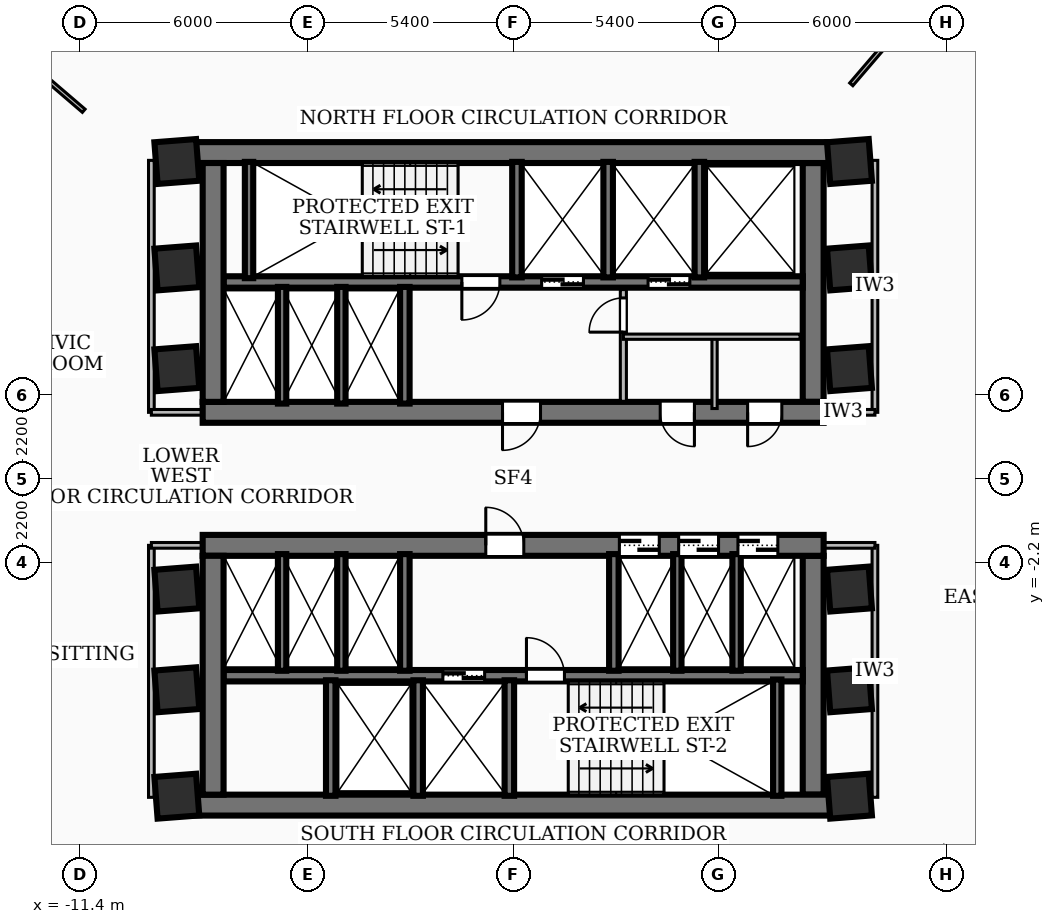
"""IFC4 building model, lengths in metres.
Left out: names, types, materials, properties, quantities, classifications, styles, units other than length and angle.
Written with IfcOpenShell. Run it as: python <this file> out.ifc"""

import sys

from ifc_helpers import new_model, si_unit, direction, frame, frame_2d, origin, origin_2d, place, context, subcontext, project, spatial, rectangle, extrude, element, fill, save


model = new_model("IFC4")
c1 = context("Model", 3, precision=1e-05, world=origin(), true_north=direction((0.0, 1.0)))
c2 = subcontext(c1, "Body", "Model", "MODEL_VIEW")
j1 = project(units=[si_unit("LENGTHUNIT", "METRE"), si_unit("PLANEANGLEUNIT", "RADIAN")], contexts=[c1])
p1 = place(None, origin())
s1 = spatial("IfcSite", under=j1, at=p1, CompositionType="ELEMENT")
p2 = place(p1, origin())
s2 = spatial("IfcBuilding", under=s1, at=p2, CompositionType="ELEMENT")
p3 = place(p2, frame((0.0, 0.0, 60.48)))
s3 = spatial("IfcBuildingStorey", under=s2, at=p3, CompositionType="ELEMENT", Elevation=60.48)
p4 = place(p3, frame((-8.78, 8.585, 0.0), z_axis=(0.0, 0.0, 1.0), x_axis=(1.0, 0.0, 0.0)))
e1 = element("IfcWall", 1, at=p4, inside=s3, PredefinedType="SHEAR", context=c2, shape_type="SweptSolid", body=[
    extrude(rectangle(XDim=17.56, YDim=0.55, at=frame_2d((8.78, 0.0))), origin(), (0.0, 0.0, 1.0), 3.32),
])
p5 = place(p3, frame((8.17, 1.75, 0.0), z_axis=(0.0, 0.0, 1.0), x_axis=(-1.0, 0.0, 0.0)))
e2 = element("IfcWall", 2, at=p5, inside=s3, PredefinedType="SHEAR", context=c2, shape_type="SweptSolid", body=[
    extrude(rectangle(XDim=16.34, YDim=0.55, at=frame_2d((8.17, 0.0))), origin(), (0.0, 0.0, 1.0), 3.32),
])
p6 = place(p5, frame((7.45, 0.0, 0.0)))
e3 = element("IfcOpeningElement", 3, at=p6, cuts=e2, PredefinedType="OPENING", context=c2, shape_type="SweptSolid", body=[
    extrude(rectangle(XDim=1.0, YDim=2.1, at=frame_2d((0.5, 1.05))), frame((0.0, 0.285, 0.0), z_axis=(0.0, -1.0, 0.0), x_axis=(1.0, 0.0, 0.0)), (0.0, 0.0, 1.0), 0.57),
])
p7 = place(p5, frame((3.4, 0.0, 0.0)))
e4 = element("IfcOpeningElement", 4, at=p7, cuts=e2, PredefinedType="OPENING", context=c2, shape_type="SweptSolid", body=[
    extrude(rectangle(XDim=0.9, YDim=2.06, at=frame_2d((0.45, 1.03))), frame((0.0, 0.285, 0.0), z_axis=(0.0, -1.0, 0.0), x_axis=(1.0, 0.0, 0.0)), (0.0, 0.0, 1.0), 0.57),
])
p8 = place(p5, frame((1.1, 0.0, 0.0)))
e5 = element("IfcOpeningElement", 5, at=p8, cuts=e2, PredefinedType="OPENING", context=c2, shape_type="SweptSolid", body=[
    extrude(rectangle(XDim=0.9, YDim=2.06, at=frame_2d((0.45, 1.03))), frame((0.0, 0.285, 0.0), z_axis=(0.0, -1.0, 0.0), x_axis=(1.0, 0.0, 0.0)), (0.0, 0.0, 1.0), 0.57),
])
for number, where, z_axis, x_axis in (
    (6, (-7.895, 2.025, 0.0), (0.0, 0.0, 1.0), (0.0, 1.0, 0.0)),
    (7, (7.895, 8.31, 0.0), (0.0, 0.0, 1.0), (0.0, -1.0, 0.0)),
):
    element("IfcWall", number, at=place(p3, frame(where, z_axis=z_axis, x_axis=x_axis)), inside=s3, PredefinedType="SHEAR", context=c2, shape_type="SweptSolid", body=[
        extrude(rectangle(XDim=6.285, YDim=0.55, at=frame_2d((3.143, 0.0))), origin(), (0.0, 0.0, 1.0), 3.32),
    ])
p9 = place(p3, frame((7.62, 5.18, 0.0), z_axis=(0.0, 0.0, 1.0), x_axis=(-1.0, 0.0, 0.0)))
e8 = element("IfcWall", 8, at=p9, inside=s3, PredefinedType="SOLIDWALL", context=c2, shape_type="SweptSolid", body=[
    extrude(rectangle(XDim=15.24, YDim=0.3, at=frame_2d((7.62, 0.0))), origin(), (0.0, 0.0, 1.0), 3.32),
])
p10 = place(p9, frame((5.77, 0.0, 0.0)))
e9 = element("IfcOpeningElement", 9, at=p10, cuts=e8, PredefinedType="OPENING", context=c2, shape_type="SweptSolid", body=[
    extrude(rectangle(XDim=1.1, YDim=2.15, at=frame_2d((0.55, 1.075))), frame((0.0, 0.16, 0.0), z_axis=(0.0, -1.0, 0.0), x_axis=(1.0, 0.0, 0.0)), (0.0, 0.0, 1.0), 0.32),
])
p11 = place(p9, frame((2.97, 0.0, 0.0)))
e10 = element("IfcOpeningElement", 10, at=p11, cuts=e8, PredefinedType="OPENING", context=c2, shape_type="SweptSolid", body=[
    extrude(rectangle(XDim=1.1, YDim=2.15, at=frame_2d((0.55, 1.075))), frame((0.0, 0.16, 0.0), z_axis=(0.0, -1.0, 0.0), x_axis=(1.0, 0.0, 0.0)), (0.0, 0.0, 1.0), 0.32),
])
p12 = place(p9, frame((7.97, 0.0, 0.0)))
e11 = element("IfcOpeningElement", 11, at=p12, cuts=e8, PredefinedType="OPENING", context=c2, shape_type="SweptSolid", body=[
    extrude(rectangle(XDim=1.0, YDim=2.1, at=frame_2d((0.5, 1.05))), frame((0.0, 0.16, 0.0), z_axis=(0.0, -1.0, 0.0), x_axis=(1.0, 0.0, 0.0)), (0.0, 0.0, 1.0), 0.32),
])
p13 = place(p3, frame((8.78, -8.585, 0.0), z_axis=(0.0, 0.0, 1.0), x_axis=(-1.0, 0.0, 0.0)))
e12 = element("IfcWall", 12, at=p13, inside=s3, PredefinedType="SHEAR", context=c2, shape_type="SweptSolid", body=[
    extrude(rectangle(XDim=17.56, YDim=0.55, at=frame_2d((8.78, 0.0))), origin(), (0.0, 0.0, 1.0), 3.32),
])
p14 = place(p3, frame((-8.17, -1.75, 0.0), z_axis=(0.0, 0.0, 1.0), x_axis=(1.0, 0.0, 0.0)))
e13 = element("IfcWall", 13, at=p14, inside=s3, PredefinedType="SHEAR", context=c2, shape_type="SweptSolid", body=[
    extrude(rectangle(XDim=16.34, YDim=0.55, at=frame_2d((8.17, 0.0))), origin(), (0.0, 0.0, 1.0), 3.32),
])
p15 = place(p14, frame((7.45, 0.0, 0.0)))
e14 = element("IfcOpeningElement", 14, at=p15, cuts=e13, PredefinedType="OPENING", context=c2, shape_type="SweptSolid", body=[
    extrude(rectangle(XDim=1.0, YDim=2.1, at=frame_2d((0.5, 1.05))), frame((0.0, 0.285, 0.0), z_axis=(0.0, -1.0, 0.0), x_axis=(1.0, 0.0, 0.0)), (0.0, 0.0, 1.0), 0.57),
])
p16 = place(p14, frame((10.965, 0.0, 0.0)))
e15 = element("IfcOpeningElement", 15, at=p16, cuts=e13, PredefinedType="OPENING", context=c2, shape_type="SweptSolid", body=[
    extrude(rectangle(XDim=1.05, YDim=2.15, at=frame_2d((0.525, 1.075))), frame((0.0, 0.285, 0.0), z_axis=(0.0, -1.0, 0.0), x_axis=(1.0, 0.0, 0.0)), (0.0, 0.0, 1.0), 0.57),
])
p17 = place(p14, frame((12.525, 0.0, 0.0)))
e16 = element("IfcOpeningElement", 16, at=p17, cuts=e13, PredefinedType="OPENING", context=c2, shape_type="SweptSolid", body=[
    extrude(rectangle(XDim=1.05, YDim=2.15, at=frame_2d((0.525, 1.075))), frame((0.0, 0.285, 0.0), z_axis=(0.0, -1.0, 0.0), x_axis=(1.0, 0.0, 0.0)), (0.0, 0.0, 1.0), 0.57),
])
p18 = place(p14, frame((14.085, 0.0, 0.0)))
e17 = element("IfcOpeningElement", 17, at=p18, cuts=e13, PredefinedType="OPENING", context=c2, shape_type="SweptSolid", body=[
    extrude(rectangle(XDim=1.05, YDim=2.15, at=frame_2d((0.525, 1.075))), frame((0.0, 0.285, 0.0), z_axis=(0.0, -1.0, 0.0), x_axis=(1.0, 0.0, 0.0)), (0.0, 0.0, 1.0), 0.57),
])
for number, where, z_axis, x_axis in (
    (18, (-7.895, -8.31, 0.0), (0.0, 0.0, 1.0), (0.0, 1.0, 0.0)),
    (19, (7.895, -2.025, 0.0), (0.0, 0.0, 1.0), (0.0, -1.0, 0.0)),
):
    element("IfcWall", number, at=place(p3, frame(where, z_axis=z_axis, x_axis=x_axis)), inside=s3, PredefinedType="SHEAR", context=c2, shape_type="SweptSolid", body=[
        extrude(rectangle(XDim=6.285, YDim=0.55, at=frame_2d((3.143, 0.0))), origin(), (0.0, 0.0, 1.0), 3.32),
    ])
p19 = place(p3, frame((-7.62, -5.18, 0.0), z_axis=(0.0, 0.0, 1.0), x_axis=(1.0, 0.0, 0.0)))
e20 = element("IfcWall", 20, at=p19, inside=s3, PredefinedType="SOLIDWALL", context=c2, shape_type="SweptSolid", body=[
    extrude(rectangle(XDim=15.24, YDim=0.3, at=frame_2d((7.62, 0.0))), origin(), (0.0, 0.0, 1.0), 3.32),
])
p20 = place(p19, frame((5.77, 0.0, 0.0)))
e21 = element("IfcOpeningElement", 21, at=p20, cuts=e20, PredefinedType="OPENING", context=c2, shape_type="SweptSolid", body=[
    extrude(rectangle(XDim=1.1, YDim=2.15, at=frame_2d((0.55, 1.075))), frame((0.0, 0.16, 0.0), z_axis=(0.0, -1.0, 0.0), x_axis=(1.0, 0.0, 0.0)), (0.0, 0.0, 1.0), 0.32),
])
p21 = place(p19, frame((7.97, 0.0, 0.0)))
e22 = element("IfcOpeningElement", 22, at=p21, cuts=e20, PredefinedType="OPENING", context=c2, shape_type="SweptSolid", body=[
    extrude(rectangle(XDim=1.0, YDim=2.1, at=frame_2d((0.5, 1.05))), frame((0.0, 0.16, 0.0), z_axis=(0.0, -1.0, 0.0), x_axis=(1.0, 0.0, 0.0)), (0.0, 0.0, 1.0), 0.32),
])
for number, where, z_axis, x_axis in (
    (23, (-6.95, 5.28, 0.0), (0.0, 0.0, 1.0), (0.0, 1.0, 0.0)),
    (24, (6.95, -8.34, 0.0), (0.0, 0.0, 1.0), (0.0, 1.0, 0.0)),
):
    element("IfcWall", number, at=place(p3, frame(where, z_axis=z_axis, x_axis=x_axis)), inside=s3, PredefinedType="SOLIDWALL", context=c2, shape_type="SweptSolid", body=[
        extrude(rectangle(XDim=3.06, YDim=0.22, at=frame_2d((1.53, 0.0))), origin(), (0.0, 0.0, 1.0), 3.32),
    ])
for number, where, z_axis, x_axis in (
    (25, (0.1, 5.3, 0.0), (0.0, 0.0, 1.0), (0.0, 1.0, 0.0)),
    (26, (2.5, 5.3, 0.0), (0.0, 0.0, 1.0), (0.0, 1.0, 0.0)),
    (27, (4.9, 5.3, 0.0), (0.0, 0.0, 1.0), (0.0, 1.0, 0.0)),
):
    element("IfcWall", number, at=place(p3, frame(where, z_axis=z_axis, x_axis=x_axis)), inside=s3, PredefinedType="SOLIDWALL", context=c2, shape_type="SweptSolid", body=[
        extrude(rectangle(XDim=3.04, YDim=0.25, at=frame_2d((1.52, 0.0))), origin(), (0.0, 0.0, 1.0), 3.32),
    ])
p22 = place(p3, frame((-2.85, 1.98, 0.0), z_axis=(0.0, 0.0, 1.0), x_axis=(0.0, 1.0, 0.0)))
e28 = element("IfcWall", 28, at=p22, inside=s3, PredefinedType="SOLIDWALL", context=c2, shape_type="SweptSolid", body=[
    extrude(rectangle(XDim=3.07, YDim=0.25, at=frame_2d((1.535, 0.0))), origin(), (0.0, 0.0, 1.0), 3.32),
])
for number, where, z_axis, x_axis in (
    (29, (-0.1, -8.34, 0.0), (0.0, 0.0, 1.0), (0.0, 1.0, 0.0)),
    (30, (-2.5, -8.34, 0.0), (0.0, 0.0, 1.0), (0.0, 1.0, 0.0)),
    (31, (-4.8, -8.34, 0.0), (0.0, 0.0, 1.0), (0.0, 1.0, 0.0)),
):
    element("IfcWall", number, at=place(p3, frame(where, z_axis=z_axis, x_axis=x_axis)), inside=s3, PredefinedType="SOLIDWALL", context=c2, shape_type="SweptSolid", body=[
        extrude(rectangle(XDim=3.04, YDim=0.25, at=frame_2d((1.52, 0.0))), origin(), (0.0, 0.0, 1.0), 3.32),
    ])
for number, where, z_axis, x_axis in (
    (32, (-2.85, -5.05, 0.0), (0.0, 0.0, 1.0), (0.0, 1.0, 0.0)),
    (33, (2.65, -5.05, 0.0), (0.0, 0.0, 1.0), (0.0, 1.0, 0.0)),
):
    element("IfcWall", number, at=place(p3, frame(where, z_axis=z_axis, x_axis=x_axis)), inside=s3, PredefinedType="SOLIDWALL", context=c2, shape_type="SweptSolid", body=[
        extrude(rectangle(XDim=3.07, YDim=0.25, at=frame_2d((1.535, 0.0))), origin(), (0.0, 0.0, 1.0), 3.32),
    ])
for number, where, z_axis, x_axis in (
    (34, (-6.08, 1.98, 0.0), (0.0, 0.0, 1.0), (0.0, 1.0, 0.0)),
    (35, (-4.52, 1.98, 0.0), (0.0, 0.0, 1.0), (0.0, 1.0, 0.0)),
    (36, (4.32, -5.05, 0.0), (0.0, 0.0, 1.0), (0.0, 1.0, 0.0)),
    (37, (5.88, -5.05, 0.0), (0.0, 0.0, 1.0), (0.0, 1.0, 0.0)),
    (38, (-6.08, -5.05, 0.0), (0.0, 0.0, 1.0), (0.0, 1.0, 0.0)),
    (39, (-4.52, -5.05, 0.0), (0.0, 0.0, 1.0), (0.0, 1.0, 0.0)),
):
    element("IfcWall", number, at=place(p3, frame(where, z_axis=z_axis, x_axis=x_axis)), inside=s3, PredefinedType="SOLIDWALL", context=c2, shape_type="SweptSolid", body=[
        extrude(rectangle(XDim=3.07, YDim=0.22, at=frame_2d((1.535, 0.0))), origin(), (0.0, 0.0, 1.0), 3.32),
    ])
for number, where, z_axis, x_axis in (
    (40, (-8.85, -5.55, 0.0), (0.0, 0.0, 1.0), (0.997, 0.077, 0.0)),
    (41, (-8.85, -2.9, 0.0), (0.0, 0.0, 1.0), (0.997, 0.077, 0.0)),
    (42, (-8.85, 2.9, 0.0), (0.0, 0.0, 1.0), (0.997, 0.077, 0.0)),
    (43, (-8.85, 5.55, 0.0), (0.0, 0.0, 1.0), (0.997, 0.077, 0.0)),
    (44, (8.85, -5.55, 0.0), (0.0, 0.0, 1.0), (0.997, 0.077, 0.0)),
    (45, (8.85, -2.9, 0.0), (0.0, 0.0, 1.0), (0.997, 0.077, 0.0)),
    (46, (8.85, 2.9, 0.0), (0.0, 0.0, 1.0), (0.997, 0.077, 0.0)),
    (47, (8.85, 5.55, 0.0), (0.0, 0.0, 1.0), (0.997, 0.077, 0.0)),
    (48, (-8.85, 8.35, 0.0), (0.0, 0.0, 1.0), (0.997, 0.077, 0.0)),
    (49, (8.85, -8.35, 0.0), (0.0, 0.0, 1.0), (0.997, 0.077, 0.0)),
    (50, (8.85, 8.35, 0.0), (0.0, 0.0, 1.0), (0.997, 0.077, 0.0)),
    (51, (-8.85, -8.35, 0.0), (0.0, 0.0, 1.0), (0.997, 0.077, 0.0)),
):
    element("IfcColumn", number, at=place(p3, frame(where, z_axis=z_axis, x_axis=x_axis)), inside=s3, PredefinedType="COLUMN", context=c2, shape_type="SweptSolid", body=[
        extrude(rectangle(XDim=1.1, YDim=1.1, at=origin_2d()), origin(), (0.0, 0.0, 1.0), 3.6),
    ])
p23 = place(p3, frame((2.9, 2.04, 0.0), z_axis=(0.0, 0.0, 1.0), x_axis=(0.0, 1.0, 0.0)))
e52 = element("IfcWall", 52, at=p23, inside=s3, PredefinedType="PARTITIONING", context=c2, shape_type="SweptSolid", body=[
    extrude(rectangle(XDim=2.94, YDim=0.16, at=frame_2d((1.47, 0.0))), origin(), (0.0, 0.0, 1.0), 2.385),
])
p24 = place(p23, frame((1.82, 0.0, 0.0)))
e53 = element("IfcOpeningElement", 53, at=p24, cuts=e52, PredefinedType="OPENING", context=c2, shape_type="SweptSolid", body=[
    extrude(rectangle(XDim=0.9, YDim=2.06, at=frame_2d((0.45, 1.03))), frame((0.0, 0.09, 0.0), z_axis=(0.0, -1.0, 0.0), x_axis=(1.0, 0.0, 0.0)), (0.0, 0.0, 1.0), 0.18),
])
p25 = place(p3, frame((2.9, 3.74, 0.0), z_axis=(0.0, 0.0, 1.0), x_axis=(1.0, 0.0, 0.0)))
e54 = element("IfcWall", 54, at=p25, inside=s3, PredefinedType="PARTITIONING", context=c2, shape_type="SweptSolid", body=[
    extrude(rectangle(XDim=4.65, YDim=0.138, at=frame_2d((2.325, 0.0))), origin(), (0.0, 0.0, 1.0), 3.32),
])
p26 = place(p3, frame((5.3, 1.85, 0.0), z_axis=(0.0, 0.0, 1.0), x_axis=(0.0, 1.0, 0.0)))
e55 = element("IfcWall", 55, at=p26, inside=s3, PredefinedType="PARTITIONING", context=c2, shape_type="SweptSolid", body=[
    extrude(rectangle(XDim=1.89, YDim=0.138, at=frame_2d((0.945, 0.0))), origin(), (0.0, 0.0, 1.0), 2.385),
])
p27 = place(p3, frame((-9.52, 1.75, 0.0), z_axis=(0.0, 0.0, 1.0), x_axis=(0.0, 1.0, 0.0)))
e56 = element("IfcWall", 56, at=p27, inside=s3, PredefinedType="PARTITIONING", context=c2, shape_type="SweptSolid", body=[
    extrude(rectangle(XDim=6.63, YDim=0.15, at=frame_2d((3.315, 0.0))), origin(), (0.0, 0.0, 1.0), 2.401),
])
p28 = place(p3, frame((-7.85, 1.75, 0.0), z_axis=(0.0, 0.0, 1.0), x_axis=(-1.0, 0.0, 0.0)))
e57 = element("IfcWall", 57, at=p28, inside=s3, PredefinedType="PARTITIONING", context=c2, shape_type="SweptSolid", body=[
    extrude(rectangle(XDim=1.67, YDim=0.15, at=frame_2d((0.835, 0.0))), origin(), (0.0, 0.0, 1.0), 2.385),
])
p29 = place(p3, frame((-9.52, -8.38, 0.0), z_axis=(0.0, 0.0, 1.0), x_axis=(0.0, 1.0, 0.0)))
e58 = element("IfcWall", 58, at=p29, inside=s3, PredefinedType="PARTITIONING", context=c2, shape_type="SweptSolid", body=[
    extrude(rectangle(XDim=6.63, YDim=0.15, at=frame_2d((3.315, 0.0))), origin(), (0.0, 0.0, 1.0), 2.401),
])
p30 = place(p3, frame((-7.85, -1.75, 0.0), z_axis=(0.0, 0.0, 1.0), x_axis=(-1.0, 0.0, 0.0)))
e59 = element("IfcWall", 59, at=p30, inside=s3, PredefinedType="PARTITIONING", context=c2, shape_type="SweptSolid", body=[
    extrude(rectangle(XDim=1.67, YDim=0.15, at=frame_2d((0.835, 0.0))), origin(), (0.0, 0.0, 1.0), 2.385),
])
p31 = place(p3, frame((9.52, 1.75, 0.0), z_axis=(0.0, 0.0, 1.0), x_axis=(0.0, 1.0, 0.0)))
e60 = element("IfcWall", 60, at=p31, inside=s3, PredefinedType="PARTITIONING", context=c2, shape_type="SweptSolid", body=[
    extrude(rectangle(XDim=6.63, YDim=0.15, at=frame_2d((3.315, 0.0))), origin(), (0.0, 0.0, 1.0), 2.401),
])
p32 = place(p3, frame((7.85, 1.75, 0.0), z_axis=(0.0, 0.0, 1.0), x_axis=(1.0, 0.0, 0.0)))
e61 = element("IfcWall", 61, at=p32, inside=s3, PredefinedType="PARTITIONING", context=c2, shape_type="SweptSolid", body=[
    extrude(rectangle(XDim=1.67, YDim=0.15, at=frame_2d((0.835, 0.0))), origin(), (0.0, 0.0, 1.0), 2.385),
])
p33 = place(p3, frame((9.52, -8.38, 0.0), z_axis=(0.0, 0.0, 1.0), x_axis=(0.0, 1.0, 0.0)))
e62 = element("IfcWall", 62, at=p33, inside=s3, PredefinedType="PARTITIONING", context=c2, shape_type="SweptSolid", body=[
    extrude(rectangle(XDim=6.63, YDim=0.15, at=frame_2d((3.315, 0.0))), origin(), (0.0, 0.0, 1.0), 2.401),
])
p34 = place(p3, frame((7.85, -1.75, 0.0), z_axis=(0.0, 0.0, 1.0), x_axis=(1.0, 0.0, 0.0)))
e63 = element("IfcWall", 63, at=p34, inside=s3, PredefinedType="PARTITIONING", context=c2, shape_type="SweptSolid", body=[
    extrude(rectangle(XDim=1.67, YDim=0.15, at=frame_2d((0.835, 0.0))), origin(), (0.0, 0.0, 1.0), 2.385),
])
p35 = place(p3, frame((8.897, 10.38, 0.0), z_axis=(0.0, 0.0, 1.0), x_axis=(0.650777932984, 0.759268122564, 0.0)))
e64 = element("IfcWall", 64, at=p35, inside=s3, PredefinedType="PARTITIONING", context=c2, shape_type="SweptSolid", body=[
    extrude(rectangle(XDim=5.984, YDim=0.11, at=frame_2d((2.992, 0.0))), origin(), (0.0, 0.0, 1.0), 3.32),
])
p36 = place(p3, frame((-11.3, 9.685, 0.0), z_axis=(0.0, 0.0, 1.0), x_axis=(-0.759206042513, 0.650850355313, 0.0)))
e65 = element("IfcWall", 65, at=p36, inside=s3, PredefinedType="PARTITIONING", context=c2, shape_type="SweptSolid", body=[
    extrude(rectangle(XDim=4.772, YDim=0.11, at=frame_2d((2.386, 0.0))), origin(), (0.0, 0.0, 1.0), 3.32),
])
p37 = place(p6, origin())
e66 = element("IfcDoor", 66, at=p37, inside=s3, OperationType="SINGLE_SWING_RIGHT", PredefinedType="DOOR", context=c2, shape_type="SweptSolid", body=[
    extrude(rectangle(XDim=1.0, YDim=2.1, at=frame_2d((0.5, 1.05))), frame((0.0, 0.025, 0.0), z_axis=(0.0, -1.0, 0.0), x_axis=(1.0, 0.0, 0.0)), (0.0, 0.0, 1.0), 0.05),
])
fill(e3, e66)
p38 = place(p15, origin())
e67 = element("IfcDoor", 67, at=p38, inside=s3, OperationType="SINGLE_SWING_LEFT", PredefinedType="DOOR", context=c2, shape_type="SweptSolid", body=[
    extrude(rectangle(XDim=1.0, YDim=2.1, at=frame_2d((0.5, 1.05))), frame((0.0, 0.025, 0.0), z_axis=(0.0, -1.0, 0.0), x_axis=(1.0, 0.0, 0.0)), (0.0, 0.0, 1.0), 0.05),
])
fill(e14, e67)
p39 = place(p10, origin())
e68 = element("IfcDoor", 68, at=p39, inside=s3, OperationType="DOUBLE_DOOR_SLIDING", PredefinedType="DOOR", context=c2, shape_type="SweptSolid", body=[
    extrude(rectangle(XDim=1.1, YDim=2.15, at=frame_2d((0.55, 1.075))), frame((0.0, 0.025, 0.0), z_axis=(0.0, -1.0, 0.0), x_axis=(1.0, 0.0, 0.0)), (0.0, 0.0, 1.0), 0.05),
])
fill(e9, e68)
p40 = place(p11, origin())
e69 = element("IfcDoor", 69, at=p40, inside=s3, OperationType="DOUBLE_DOOR_SLIDING", PredefinedType="DOOR", context=c2, shape_type="SweptSolid", body=[
    extrude(rectangle(XDim=1.1, YDim=2.15, at=frame_2d((0.55, 1.075))), frame((0.0, 0.025, 0.0), z_axis=(0.0, -1.0, 0.0), x_axis=(1.0, 0.0, 0.0)), (0.0, 0.0, 1.0), 0.05),
])
fill(e10, e69)
p41 = place(p12, origin())
e70 = element("IfcDoor", 70, at=p41, inside=s3, OperationType="SINGLE_SWING_RIGHT", PredefinedType="DOOR", context=c2, shape_type="SweptSolid", body=[
    extrude(rectangle(XDim=1.0, YDim=2.1, at=frame_2d((0.5, 1.05))), frame((0.0, 0.025, 0.0), z_axis=(0.0, -1.0, 0.0), x_axis=(1.0, 0.0, 0.0)), (0.0, 0.0, 1.0), 0.05),
])
fill(e11, e70)
p42 = place(p20, origin())
e71 = element("IfcDoor", 71, at=p42, inside=s3, OperationType="DOUBLE_DOOR_SLIDING", PredefinedType="DOOR", context=c2, shape_type="SweptSolid", body=[
    extrude(rectangle(XDim=1.1, YDim=2.15, at=frame_2d((0.55, 1.075))), frame((0.0, 0.025, 0.0), z_axis=(0.0, -1.0, 0.0), x_axis=(1.0, 0.0, 0.0)), (0.0, 0.0, 1.0), 0.05),
])
fill(e21, e71)
p43 = place(p21, origin())
e72 = element("IfcDoor", 72, at=p43, inside=s3, OperationType="SINGLE_SWING_LEFT", PredefinedType="DOOR", context=c2, shape_type="SweptSolid", body=[
    extrude(rectangle(XDim=1.0, YDim=2.1, at=frame_2d((0.5, 1.05))), frame((0.0, 0.025, 0.0), z_axis=(0.0, -1.0, 0.0), x_axis=(1.0, 0.0, 0.0)), (0.0, 0.0, 1.0), 0.05),
])
fill(e22, e72)
p44 = place(p16, origin())
e73 = element("IfcDoor", 73, at=p44, inside=s3, OperationType="DOUBLE_DOOR_SLIDING", PredefinedType="DOOR", context=c2, shape_type="SweptSolid", body=[
    extrude(rectangle(XDim=1.05, YDim=2.15, at=frame_2d((0.525, 1.075))), frame((0.0, 0.025, 0.0), z_axis=(0.0, -1.0, 0.0), x_axis=(1.0, 0.0, 0.0)), (0.0, 0.0, 1.0), 0.05),
])
fill(e15, e73)
p45 = place(p17, origin())
e74 = element("IfcDoor", 74, at=p45, inside=s3, OperationType="DOUBLE_DOOR_SLIDING", PredefinedType="DOOR", context=c2, shape_type="SweptSolid", body=[
    extrude(rectangle(XDim=1.05, YDim=2.15, at=frame_2d((0.525, 1.075))), frame((0.0, 0.025, 0.0), z_axis=(0.0, -1.0, 0.0), x_axis=(1.0, 0.0, 0.0)), (0.0, 0.0, 1.0), 0.05),
])
fill(e16, e74)
p46 = place(p18, origin())
e75 = element("IfcDoor", 75, at=p46, inside=s3, OperationType="DOUBLE_DOOR_SLIDING", PredefinedType="DOOR", context=c2, shape_type="SweptSolid", body=[
    extrude(rectangle(XDim=1.05, YDim=2.15, at=frame_2d((0.525, 1.075))), frame((0.0, 0.025, 0.0), z_axis=(0.0, -1.0, 0.0), x_axis=(1.0, 0.0, 0.0)), (0.0, 0.0, 1.0), 0.05),
])
fill(e17, e75)
p47 = place(p7, origin())
e76 = element("IfcDoor", 76, at=p47, inside=s3, OperationType="SINGLE_SWING_LEFT", PredefinedType="DOOR", context=c2, shape_type="SweptSolid", body=[
    extrude(rectangle(XDim=0.9, YDim=2.06, at=frame_2d((0.45, 1.03))), frame((0.0, 0.025, 0.0), z_axis=(0.0, -1.0, 0.0), x_axis=(1.0, 0.0, 0.0)), (0.0, 0.0, 1.0), 0.05),
])
fill(e4, e76)
p48 = place(p8, origin())
e77 = element("IfcDoor", 77, at=p48, inside=s3, OperationType="SINGLE_SWING_RIGHT", PredefinedType="DOOR", context=c2, shape_type="SweptSolid", body=[
    extrude(rectangle(XDim=0.9, YDim=2.06, at=frame_2d((0.45, 1.03))), frame((0.0, 0.025, 0.0), z_axis=(0.0, -1.0, 0.0), x_axis=(1.0, 0.0, 0.0)), (0.0, 0.0, 1.0), 0.05),
])
fill(e5, e77)
p49 = place(p24, origin())
e78 = element("IfcDoor", 78, at=p49, inside=s3, OperationType="SINGLE_SWING_LEFT", PredefinedType="DOOR", context=c2, shape_type="SweptSolid", body=[
    extrude(rectangle(XDim=0.9, YDim=2.06, at=frame_2d((0.45, 1.03))), frame((0.0, 0.025, 0.0), z_axis=(0.0, -1.0, 0.0), x_axis=(1.0, 0.0, 0.0)), (0.0, 0.0, 1.0), 0.05),
])
fill(e53, e78)
save(model, sys.argv[1])
